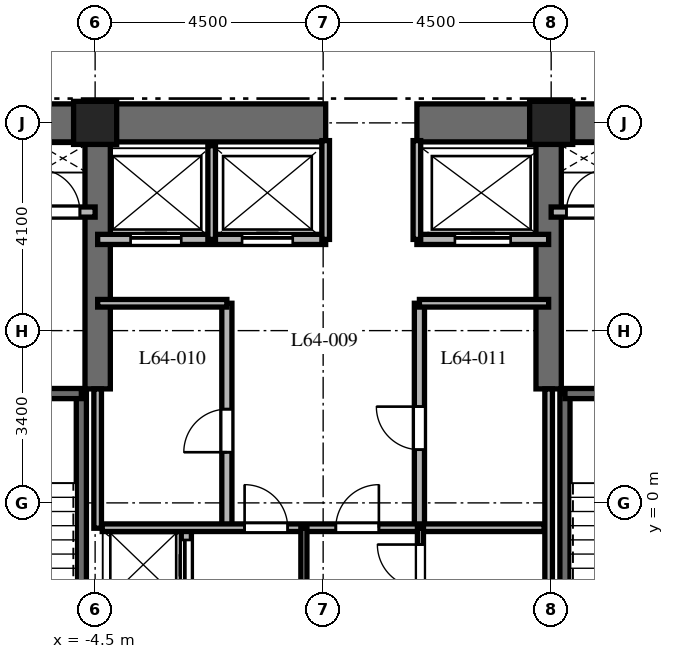
"""IFC4 building model, lengths in metres.
Left out: names, types, materials, properties, quantities, classifications, styles, units other than length and angle.
Written with IfcOpenShell. Run it as: python <this file> out.ifc"""

import sys

from ifc_helpers import new_model, si_unit, direction, frame, frame_2d, origin, origin_2d, place, context, subcontext, project, spatial, rectangle, extrude, element, fill, save


model = new_model("IFC4")
c1 = context("Model", 3, precision=1e-05, world=origin(), true_north=direction((0.0, 1.0)))
c2 = subcontext(c1, "Body", "Model", "MODEL_VIEW")
j1 = project(units=[si_unit("LENGTHUNIT", "METRE"), si_unit("PLANEANGLEUNIT", "RADIAN")], contexts=[c1])
p1 = place(None, origin())
s1 = spatial("IfcSite", under=j1, at=p1, CompositionType="ELEMENT")
p2 = place(p1, origin())
s2 = spatial("IfcBuilding", under=s1, at=p2, CompositionType="ELEMENT")
p3 = place(p2, frame((0.0, 0.0, 255.9)))
s3 = spatial("IfcBuildingStorey", under=s2, at=p3, CompositionType="ELEMENT", Elevation=255.9)
p4 = place(p3, frame((-9.375, 7.5, 0.0), z_axis=(0.0, 0.0, 1.0), x_axis=(1.0, 0.0, 0.0)))
e1 = element("IfcWall", 1, at=p4, inside=s3, PredefinedType="SHEAR", context=c2, shape_type="SweptSolid", body=[
    extrude(rectangle(XDim=9.425, YDim=0.75, at=frame_2d((4.712, 0.0))), origin(), (0.0, 0.0, 1.0), 5.4),
])
p5 = place(p3, frame((1.85, 7.5, 0.0), z_axis=(0.0, 0.0, 1.0), x_axis=(1.0, 0.0, 0.0)))
e2 = element("IfcWall", 2, at=p5, inside=s3, PredefinedType="SHEAR", context=c2, shape_type="SweptSolid", body=[
    extrude(rectangle(XDim=7.525, YDim=0.75, at=frame_2d((3.762, 0.0))), origin(), (0.0, 0.0, 1.0), 5.4),
])
for number, where, z_axis, x_axis in (
    (3, (-4.45, 2.25, 0.0), (0.0, 0.0, 1.0), (0.0, 1.0, 0.0)),
    (4, (4.45, 2.25, 0.0), (0.0, 0.0, 1.0), (0.0, 1.0, 0.0)),
):
    element("IfcWall", number, at=place(p3, frame(where, z_axis=z_axis, x_axis=x_axis)), inside=s3, PredefinedType="SHEAR", context=c2, shape_type="SweptSolid", body=[
        extrude(rectangle(XDim=4.875, YDim=0.5, at=frame_2d((2.438, 0.0))), origin(), (0.0, 0.0, 1.0), 5.4),
    ])
p6 = place(p3, frame((-4.772, -6.985, 0.0), z_axis=(0.0, 0.0, 1.0), x_axis=(0.0, 1.0, 0.0)))
e5 = element("IfcWall", 5, at=p6, inside=s3, PredefinedType="SHEAR", context=c2, shape_type="SweptSolid", body=[
    extrude(rectangle(XDim=9.143, YDim=0.2, at=frame_2d((4.572, 0.0))), origin(), (0.0, 0.0, 1.0), 5.4),
])
p7 = place(p3, frame((-8.458, 2.158, 0.0), z_axis=(0.0, 0.0, 1.0), x_axis=(1.0, 0.0, 0.0)))
e6 = element("IfcWall", 6, at=p7, inside=s3, PredefinedType="SHEAR", context=c2, shape_type="SweptSolid", body=[
    extrude(rectangle(XDim=3.686, YDim=0.2, at=frame_2d((1.843, 0.0))), origin(), (0.0, 0.0, 1.0), 5.4),
])
p8 = place(p7, frame((1.3, 0.0, 0.0)))
e7 = element("IfcOpeningElement", 7, at=p8, cuts=e6, PredefinedType="OPENING", context=c2, shape_type="SweptSolid", body=[
    extrude(rectangle(XDim=1.0, YDim=2.15, at=frame_2d((0.5, 1.075))), frame((0.0, 0.11, 0.0), z_axis=(0.0, -1.0, 0.0), x_axis=(1.0, 0.0, 0.0)), (0.0, 0.0, 1.0), 0.22),
])
p9 = place(p3, frame((4.772, -6.985, 0.0), z_axis=(0.0, 0.0, 1.0), x_axis=(0.0, 1.0, 0.0)))
e8 = element("IfcWall", 8, at=p9, inside=s3, PredefinedType="SHEAR", context=c2, shape_type="SweptSolid", body=[
    extrude(rectangle(XDim=9.143, YDim=0.2, at=frame_2d((4.572, 0.0))), origin(), (0.0, 0.0, 1.0), 5.4),
])
p10 = place(p3, frame((4.772, 2.158, 0.0), z_axis=(0.0, 0.0, 1.0), x_axis=(1.0, 0.0, 0.0)))
e9 = element("IfcWall", 9, at=p10, inside=s3, PredefinedType="SHEAR", context=c2, shape_type="SweptSolid", body=[
    extrude(rectangle(XDim=3.686, YDim=0.2, at=frame_2d((1.843, 0.0))), origin(), (0.0, 0.0, 1.0), 5.4),
])
p11 = place(p10, frame((1.35, 0.0, 0.0)))
e10 = element("IfcOpeningElement", 10, at=p11, cuts=e9, PredefinedType="OPENING", context=c2, shape_type="SweptSolid", body=[
    extrude(rectangle(XDim=1.0, YDim=2.15, at=frame_2d((0.5, 1.075))), frame((0.0, 0.11, 0.0), z_axis=(0.0, -1.0, 0.0), x_axis=(1.0, 0.0, 0.0)), (0.0, 0.0, 1.0), 0.22),
])
for number, where, z_axis, x_axis in (
    (11, (4.5, 7.5, 0.0), (0.0, 0.0, 1.0), (1.0, 0.0, 0.0)),
    (12, (-4.5, 7.5, 0.0), (0.0, 0.0, 1.0), (1.0, 0.0, 0.0)),
):
    element("IfcColumn", number, at=place(p3, frame(where, z_axis=z_axis, x_axis=x_axis)), inside=s3, PredefinedType="COLUMN", context=c2, shape_type="SweptSolid", body=[
        extrude(rectangle(XDim=0.85, YDim=0.85, at=origin_2d()), origin(), (0.0, 0.0, 1.0), 5.4),
    ])
p12 = place(p3, frame((-8.55, 5.74, 0.0), z_axis=(0.0, 0.0, 1.0), x_axis=(1.0, 0.0, 0.0)))
e13 = element("IfcWall", 13, at=p12, inside=s3, PredefinedType="PARTITIONING", context=c2, shape_type="SweptSolid", body=[
    extrude(rectangle(XDim=4.05, YDim=0.2, at=frame_2d((2.025, 0.0))), origin(), (0.0, 0.0, 1.0), 5.1),
])
p13 = place(p12, frame((0.75, 0.0, 0.0)))
e14 = element("IfcOpeningElement", 14, at=p13, cuts=e13, PredefinedType="OPENING", context=c2, shape_type="SweptSolid", body=[
    extrude(rectangle(XDim=1.1, YDim=2.2, at=frame_2d((0.55, 1.1))), frame((0.0, 0.11, 0.0), z_axis=(0.0, -1.0, 0.0), x_axis=(1.0, 0.0, 0.0)), (0.0, 0.0, 1.0), 0.22),
])
p14 = place(p12, frame((2.9, 0.0, 0.0)))
e15 = element("IfcOpeningElement", 15, at=p14, cuts=e13, PredefinedType="OPENING", context=c2, shape_type="SweptSolid", body=[
    extrude(rectangle(XDim=0.85, YDim=2.03, at=frame_2d((0.425, 1.015))), frame((0.0, 0.11, 0.0), z_axis=(0.0, -1.0, 0.0), x_axis=(1.0, 0.0, 0.0)), (0.0, 0.0, 1.0), 0.22),
])
p15 = place(p3, frame((4.5, 5.74, 0.0), z_axis=(0.0, 0.0, 1.0), x_axis=(1.0, 0.0, 0.0)))
e16 = element("IfcWall", 16, at=p15, inside=s3, PredefinedType="PARTITIONING", context=c2, shape_type="SweptSolid", body=[
    extrude(rectangle(XDim=4.05, YDim=0.2, at=frame_2d((2.025, 0.0))), origin(), (0.0, 0.0, 1.0), 5.1),
])
p16 = place(p15, frame((0.3, 0.0, 0.0)))
e17 = element("IfcOpeningElement", 17, at=p16, cuts=e16, PredefinedType="OPENING", context=c2, shape_type="SweptSolid", body=[
    extrude(rectangle(XDim=0.85, YDim=2.03, at=frame_2d((0.425, 1.015))), frame((0.0, 0.11, 0.0), z_axis=(0.0, -1.0, 0.0), x_axis=(1.0, 0.0, 0.0)), (0.0, 0.0, 1.0), 0.22),
])
p17 = place(p15, frame((2.15, 0.0, 0.0)))
e18 = element("IfcOpeningElement", 18, at=p17, cuts=e16, PredefinedType="OPENING", context=c2, shape_type="SweptSolid", body=[
    extrude(rectangle(XDim=1.1, YDim=2.2, at=frame_2d((0.55, 1.1))), frame((0.0, 0.11, 0.0), z_axis=(0.0, -1.0, 0.0), x_axis=(1.0, 0.0, 0.0)), (0.0, 0.0, 1.0), 0.22),
])
p18 = place(p3, frame((-2.7, -1.972, 0.0), z_axis=(0.0, 0.0, 1.0), x_axis=(0.0, 1.0, 0.0)))
e19 = element("IfcWall", 19, at=p18, inside=s3, PredefinedType="PARTITIONING", context=c2, shape_type="SweptSolid", body=[
    extrude(rectangle(XDim=1.472, YDim=0.2, at=frame_2d((0.736, 0.0))), origin(), (0.0, 0.0, 1.0), 5.1),
])
p19 = place(p18, frame((0.24, 0.0, 0.0)))
e20 = element("IfcOpeningElement", 20, at=p19, cuts=e19, PredefinedType="OPENING", context=c2, shape_type="SweptSolid", body=[
    extrude(rectangle(XDim=1.0, YDim=2.2, at=frame_2d((0.5, 1.1))), frame((0.0, 0.11, 0.0), z_axis=(0.0, -1.0, 0.0), x_axis=(1.0, 0.0, 0.0)), (0.0, 0.0, 1.0), 0.22),
])
p20 = place(p3, frame((-4.45, 5.2, 0.0), z_axis=(0.0, 0.0, 1.0), x_axis=(1.0, 0.0, 0.0)))
e21 = element("IfcWall", 21, at=p20, inside=s3, PredefinedType="PARTITIONING", context=c2, shape_type="SweptSolid", body=[
    extrude(rectangle(XDim=4.5, YDim=0.2, at=frame_2d((2.25, 0.0))), origin(), (0.0, 0.0, 1.0), 5.1),
])
p21 = place(p20, frame((0.65, 0.0, 0.0)))
e22 = element("IfcOpeningElement", 22, at=p21, cuts=e21, PredefinedType="OPENING", context=c2, shape_type="SweptSolid", body=[
    extrude(rectangle(XDim=1.0, YDim=2.2, at=frame_2d((0.5, 1.1))), frame((0.0, 0.11, 0.0), z_axis=(0.0, -1.0, 0.0), x_axis=(1.0, 0.0, 0.0)), (0.0, 0.0, 1.0), 0.22),
])
p22 = place(p20, frame((2.85, 0.0, 0.0)))
e23 = element("IfcOpeningElement", 23, at=p22, cuts=e21, PredefinedType="OPENING", context=c2, shape_type="SweptSolid", body=[
    extrude(rectangle(XDim=1.0, YDim=2.2, at=frame_2d((0.5, 1.1))), frame((0.0, 0.11, 0.0), z_axis=(0.0, -1.0, 0.0), x_axis=(1.0, 0.0, 0.0)), (0.0, 0.0, 1.0), 0.22),
])
p23 = place(p3, frame((1.85, 5.2, 0.0), z_axis=(0.0, 0.0, 1.0), x_axis=(1.0, 0.0, 0.0)))
e24 = element("IfcWall", 24, at=p23, inside=s3, PredefinedType="PARTITIONING", context=c2, shape_type="SweptSolid", body=[
    extrude(rectangle(XDim=2.6, YDim=0.2, at=frame_2d((1.3, 0.0))), origin(), (0.0, 0.0, 1.0), 5.1),
])
p24 = place(p23, frame((0.75, 0.0, 0.0)))
e25 = element("IfcOpeningElement", 25, at=p24, cuts=e24, PredefinedType="OPENING", context=c2, shape_type="SweptSolid", body=[
    extrude(rectangle(XDim=1.1, YDim=2.2, at=frame_2d((0.55, 1.1))), frame((0.0, 0.11, 0.0), z_axis=(0.0, -1.0, 0.0), x_axis=(1.0, 0.0, 0.0)), (0.0, 0.0, 1.0), 0.22),
])
p25 = place(p3, frame((-2.2, 5.2, 0.0), z_axis=(0.0, 0.0, 1.0), x_axis=(0.0, 1.0, 0.0)))
e26 = element("IfcWall", 26, at=p25, inside=s3, PredefinedType="PARTITIONING", context=c2, shape_type="SweptSolid", body=[
    extrude(rectangle(XDim=1.85, YDim=0.15, at=frame_2d((0.925, 0.0))), origin(), (0.0, 0.0, 1.0), 5.1),
])
for number, where, z_axis, x_axis in (
    (27, (0.05, 5.2, 0.0), (0.0, 0.0, 1.0), (0.0, 1.0, 0.0)),
    (28, (1.85, 5.2, 0.0), (0.0, 0.0, 1.0), (0.0, 1.0, 0.0)),
):
    element("IfcWall", number, at=place(p3, frame(where, z_axis=z_axis, x_axis=x_axis)), inside=s3, PredefinedType="PARTITIONING", context=c2, shape_type="SweptSolid", body=[
        extrude(rectangle(XDim=1.95, YDim=0.15, at=frame_2d((0.975, 0.0))), origin(), (0.0, 0.0, 1.0), 5.1),
    ])
p26 = place(p3, frame((-4.45, -0.5, 0.0), z_axis=(0.0, 0.0, 1.0), x_axis=(0.0, 1.0, 0.0)))
e29 = element("IfcWall", 29, at=p26, inside=s3, PredefinedType="PARTITIONING", context=c2, shape_type="SweptSolid", body=[
    extrude(rectangle(XDim=2.75, YDim=0.15, at=frame_2d((1.375, 0.0))), origin(), (0.0, 0.0, 1.0), 5.1),
])
p27 = place(p3, frame((4.45, -1.972, 0.0), z_axis=(0.0, 0.0, 1.0), x_axis=(0.0, 1.0, 0.0)))
e30 = element("IfcWall", 30, at=p27, inside=s3, PredefinedType="PARTITIONING", context=c2, shape_type="SweptSolid", body=[
    extrude(rectangle(XDim=4.222, YDim=0.15, at=frame_2d((2.111, 0.0))), origin(), (0.0, 0.0, 1.0), 5.1),
])
p28 = place(p3, frame((-1.9, -0.5, 0.0), z_axis=(0.0, 0.0, 1.0), x_axis=(0.0, 1.0, 0.0)))
e31 = element("IfcWall", 31, at=p28, inside=s3, PredefinedType="PARTITIONING", context=c2, shape_type="SweptSolid", body=[
    extrude(rectangle(XDim=4.44, YDim=0.2, at=frame_2d((2.22, 0.0))), origin(), (0.0, 0.0, 1.0), 5.1),
])
p29 = place(p28, frame((1.5, 0.0, 0.0)))
e32 = element("IfcOpeningElement", 32, at=p29, cuts=e31, PredefinedType="OPENING", context=c2, shape_type="SweptSolid", body=[
    extrude(rectangle(XDim=0.85, YDim=2.03, at=frame_2d((0.425, 1.015))), frame((0.0, 0.11, 0.0), z_axis=(0.0, -1.0, 0.0), x_axis=(1.0, 0.0, 0.0)), (0.0, 0.0, 1.0), 0.22),
])
p30 = place(p3, frame((-4.45, 3.94, 0.0), z_axis=(0.0, 0.0, 1.0), x_axis=(1.0, 0.0, 0.0)))
e33 = element("IfcWall", 33, at=p30, inside=s3, PredefinedType="PARTITIONING", context=c2, shape_type="SweptSolid", body=[
    extrude(rectangle(XDim=2.55, YDim=0.15, at=frame_2d((1.275, 0.0))), origin(), (0.0, 0.0, 1.0), 5.1),
])
p31 = place(p3, frame((1.9, -0.5, 0.0), z_axis=(0.0, 0.0, 1.0), x_axis=(0.0, 1.0, 0.0)))
e34 = element("IfcWall", 34, at=p31, inside=s3, PredefinedType="PARTITIONING", context=c2, shape_type="SweptSolid", body=[
    extrude(rectangle(XDim=4.44, YDim=0.2, at=frame_2d((2.22, 0.0))), origin(), (0.0, 0.0, 1.0), 5.1),
])
p32 = place(p31, frame((1.55, 0.0, 0.0)))
e35 = element("IfcOpeningElement", 35, at=p32, cuts=e34, PredefinedType="OPENING", context=c2, shape_type="SweptSolid", body=[
    extrude(rectangle(XDim=0.85, YDim=2.03, at=frame_2d((0.425, 1.015))), frame((0.0, 0.11, 0.0), z_axis=(0.0, -1.0, 0.0), x_axis=(1.0, 0.0, 0.0)), (0.0, 0.0, 1.0), 0.22),
])
p33 = place(p3, frame((1.9, 3.94, 0.0), z_axis=(0.0, 0.0, 1.0), x_axis=(1.0, 0.0, 0.0)))
e36 = element("IfcWall", 36, at=p33, inside=s3, PredefinedType="PARTITIONING", context=c2, shape_type="SweptSolid", body=[
    extrude(rectangle(XDim=2.55, YDim=0.15, at=frame_2d((1.275, 0.0))), origin(), (0.0, 0.0, 1.0), 5.1),
])
p34 = place(p3, frame((-4.36, -0.49, 0.0), z_axis=(0.0, 0.0, 1.0), x_axis=(1.0, 0.0, 0.0)))
e37 = element("IfcWall", 37, at=p34, inside=s3, PredefinedType="PARTITIONING", context=c2, shape_type="SweptSolid", body=[
    extrude(rectangle(XDim=8.72, YDim=0.15, at=frame_2d((4.36, 0.0))), origin(), (0.0, 0.0, 1.0), 5.1),
])
p35 = place(p34, frame((2.81, 0.0, 0.0)))
e38 = element("IfcOpeningElement", 38, at=p35, cuts=e37, PredefinedType="OPENING", context=c2, shape_type="SweptSolid", body=[
    extrude(rectangle(XDim=0.85, YDim=2.03, at=frame_2d((0.425, 1.015))), frame((0.0, 0.085, 0.0), z_axis=(0.0, -1.0, 0.0), x_axis=(1.0, 0.0, 0.0)), (0.0, 0.0, 1.0), 0.17),
])
p36 = place(p34, frame((4.61, 0.0, 0.0)))
e39 = element("IfcOpeningElement", 39, at=p36, cuts=e37, PredefinedType="OPENING", context=c2, shape_type="SweptSolid", body=[
    extrude(rectangle(XDim=0.85, YDim=2.03, at=frame_2d((0.425, 1.015))), frame((0.0, 0.085, 0.0), z_axis=(0.0, -1.0, 0.0), x_axis=(1.0, 0.0, 0.0)), (0.0, 0.0, 1.0), 0.17),
])
p37 = place(p3, frame((-0.38, -1.972, 0.0), z_axis=(0.0, 0.0, 1.0), x_axis=(0.0, 1.0, 0.0)))
e40 = element("IfcWall", 40, at=p37, inside=s3, PredefinedType="PARTITIONING", context=c2, shape_type="SweptSolid", body=[
    extrude(rectangle(XDim=1.472, YDim=0.12, at=frame_2d((0.736, 0.0))), origin(), (0.0, 0.0, 1.0), 5.1),
])
p38 = place(p3, frame((1.92, -1.972, 0.0), z_axis=(0.0, 0.0, 1.0), x_axis=(0.0, 1.0, 0.0)))
e41 = element("IfcWall", 41, at=p38, inside=s3, PredefinedType="PARTITIONING", context=c2, shape_type="SweptSolid", body=[
    extrude(rectangle(XDim=1.472, YDim=0.12, at=frame_2d((0.736, 0.0))), origin(), (0.0, 0.0, 1.0), 5.1),
])
p39 = place(p38, frame((0.3, 0.0, 0.0)))
e42 = element("IfcOpeningElement", 42, at=p39, cuts=e41, PredefinedType="OPENING", context=c2, shape_type="SweptSolid", body=[
    extrude(rectangle(XDim=0.85, YDim=2.03, at=frame_2d((0.425, 1.015))), frame((0.0, 0.07, 0.0), z_axis=(0.0, -1.0, 0.0), x_axis=(1.0, 0.0, 0.0)), (0.0, 0.0, 1.0), 0.14),
])
p40 = place(p14, origin())
e43 = element("IfcDoor", 43, at=p40, inside=s3, OperationType="SINGLE_SWING_LEFT", PredefinedType="DOOR", context=c2, shape_type="SweptSolid", body=[
    extrude(rectangle(XDim=0.85, YDim=2.03, at=frame_2d((0.425, 1.015))), frame((0.0, 0.025, 0.0), z_axis=(0.0, -1.0, 0.0), x_axis=(1.0, 0.0, 0.0)), (0.0, 0.0, 1.0), 0.05),
])
fill(e15, e43)
p41 = place(p16, origin())
e44 = element("IfcDoor", 44, at=p41, inside=s3, OperationType="SINGLE_SWING_RIGHT", PredefinedType="DOOR", context=c2, shape_type="SweptSolid", body=[
    extrude(rectangle(XDim=0.85, YDim=2.03, at=frame_2d((0.425, 1.015))), frame((0.0, 0.025, 0.0), z_axis=(0.0, -1.0, 0.0), x_axis=(1.0, 0.0, 0.0)), (0.0, 0.0, 1.0), 0.05),
])
fill(e17, e44)
p42 = place(p19, origin())
e45 = element("IfcDoor", 45, at=p42, inside=s3, OperationType="SLIDING_TO_LEFT", PredefinedType="DOOR", context=c2, shape_type="SweptSolid", body=[
    extrude(rectangle(XDim=1.0, YDim=2.2, at=frame_2d((0.5, 1.1))), frame((0.0, 0.025, 0.0), z_axis=(0.0, -1.0, 0.0), x_axis=(1.0, 0.0, 0.0)), (0.0, 0.0, 1.0), 0.05),
])
fill(e20, e45)
p43 = place(p21, origin())
e46 = element("IfcDoor", 46, at=p43, inside=s3, OperationType="SLIDING_TO_LEFT", PredefinedType="DOOR", context=c2, shape_type="SweptSolid", body=[
    extrude(rectangle(XDim=1.0, YDim=2.2, at=frame_2d((0.5, 1.1))), frame((0.0, 0.025, 0.0), z_axis=(0.0, -1.0, 0.0), x_axis=(1.0, 0.0, 0.0)), (0.0, 0.0, 1.0), 0.05),
])
fill(e22, e46)
p44 = place(p22, origin())
e47 = element("IfcDoor", 47, at=p44, inside=s3, OperationType="SLIDING_TO_RIGHT", PredefinedType="DOOR", context=c2, shape_type="SweptSolid", body=[
    extrude(rectangle(XDim=1.0, YDim=2.2, at=frame_2d((0.5, 1.1))), frame((0.0, 0.025, 0.0), z_axis=(0.0, -1.0, 0.0), x_axis=(1.0, 0.0, 0.0)), (0.0, 0.0, 1.0), 0.05),
])
fill(e23, e47)
p45 = place(p24, origin())
e48 = element("IfcDoor", 48, at=p45, inside=s3, OperationType="SLIDING_TO_RIGHT", PredefinedType="DOOR", context=c2, shape_type="SweptSolid", body=[
    extrude(rectangle(XDim=1.1, YDim=2.2, at=frame_2d((0.55, 1.1))), frame((0.0, 0.025, 0.0), z_axis=(0.0, -1.0, 0.0), x_axis=(1.0, 0.0, 0.0)), (0.0, 0.0, 1.0), 0.05),
])
fill(e25, e48)
p46 = place(p29, origin())
e49 = element("IfcDoor", 49, at=p46, inside=s3, OperationType="SINGLE_SWING_LEFT", PredefinedType="DOOR", context=c2, shape_type="SweptSolid", body=[
    extrude(rectangle(XDim=0.85, YDim=2.03, at=frame_2d((0.425, 1.015))), frame((0.0, 0.025, 0.0), z_axis=(0.0, -1.0, 0.0), x_axis=(1.0, 0.0, 0.0)), (0.0, 0.0, 1.0), 0.05),
])
fill(e32, e49)
p47 = place(p32, origin())
e50 = element("IfcDoor", 50, at=p47, inside=s3, OperationType="SINGLE_SWING_RIGHT", PredefinedType="DOOR", context=c2, shape_type="SweptSolid", body=[
    extrude(rectangle(XDim=0.85, YDim=2.03, at=frame_2d((0.425, 1.015))), frame((0.0, 0.025, 0.0), z_axis=(0.0, -1.0, 0.0), x_axis=(1.0, 0.0, 0.0)), (0.0, 0.0, 1.0), 0.05),
])
fill(e35, e50)
p48 = place(p35, origin())
e51 = element("IfcDoor", 51, at=p48, inside=s3, OperationType="SINGLE_SWING_LEFT", PredefinedType="DOOR", context=c2, shape_type="SweptSolid", body=[
    extrude(rectangle(XDim=0.85, YDim=2.03, at=frame_2d((0.425, 1.015))), frame((0.0, 0.025, 0.0), z_axis=(0.0, -1.0, 0.0), x_axis=(1.0, 0.0, 0.0)), (0.0, 0.0, 1.0), 0.05),
])
fill(e38, e51)
p49 = place(p36, origin())
e52 = element("IfcDoor", 52, at=p49, inside=s3, OperationType="SINGLE_SWING_RIGHT", PredefinedType="DOOR", context=c2, shape_type="SweptSolid", body=[
    extrude(rectangle(XDim=0.85, YDim=2.03, at=frame_2d((0.425, 1.015))), frame((0.0, 0.025, 0.0), z_axis=(0.0, -1.0, 0.0), x_axis=(1.0, 0.0, 0.0)), (0.0, 0.0, 1.0), 0.05),
])
fill(e39, e52)
p50 = place(p39, origin())
e53 = element("IfcDoor", 53, at=p50, inside=s3, OperationType="SINGLE_SWING_RIGHT", PredefinedType="DOOR", context=c2, shape_type="SweptSolid", body=[
    extrude(rectangle(XDim=0.85, YDim=2.03, at=frame_2d((0.425, 1.015))), frame((0.0, 0.025, 0.0), z_axis=(0.0, -1.0, 0.0), x_axis=(1.0, 0.0, 0.0)), (0.0, 0.0, 1.0), 0.05),
])
fill(e42, e53)
save(model, sys.argv[1])
